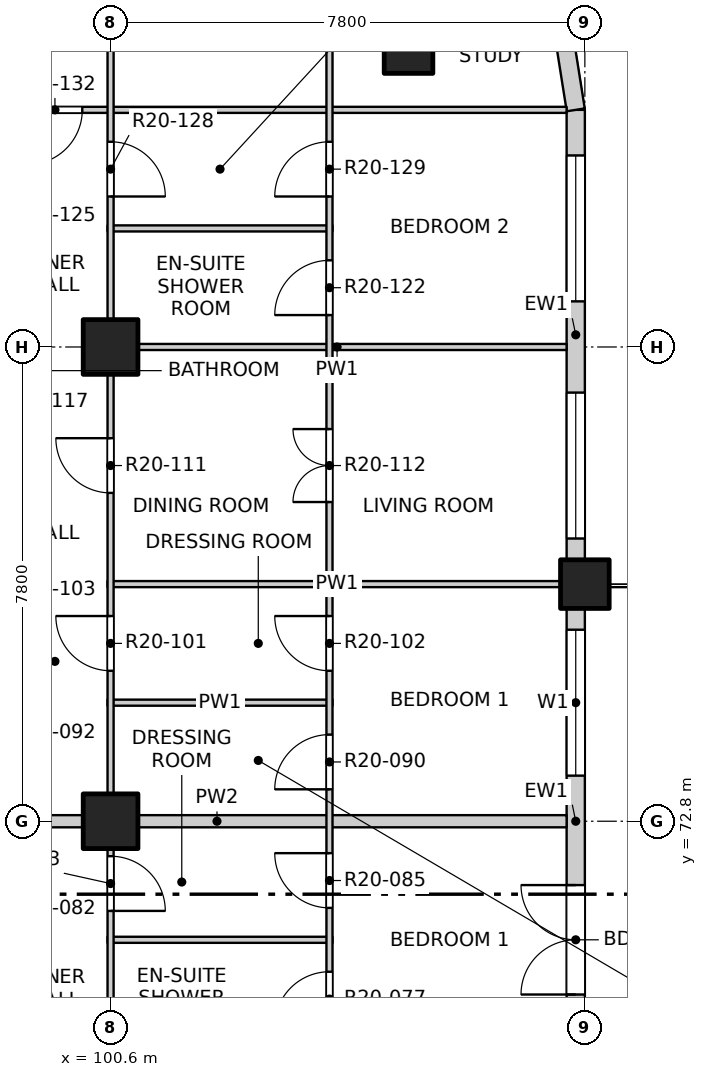
"""IFC4 building model, lengths in metres.
Left out: names, types, materials, properties, quantities, classifications, styles, units other than length and angle.
Written with IfcOpenShell. Run it as: python <this file> out.ifc"""

import sys

from ifc_helpers import new_model, si_unit, direction, frame, frame_2d, origin, origin_2d, place, context, subcontext, project, spatial, rectangle, extrude, element, fill, save


model = new_model("IFC4")
c1 = context("Model", 3, precision=1e-05, world=origin(), true_north=direction((0.0, 1.0)))
c2 = subcontext(c1, "Body", "Model", "MODEL_VIEW")
j1 = project(units=[si_unit("LENGTHUNIT", "METRE"), si_unit("PLANEANGLEUNIT", "RADIAN")], contexts=[c1])
p1 = place(None, origin())
s1 = spatial("IfcSite", under=j1, at=p1, CompositionType="ELEMENT")
p2 = place(p1, origin())
s2 = spatial("IfcBuilding", under=s1, at=p2, CompositionType="ELEMENT")
p3 = place(p2, frame((0.0, 0.0, 204.1)))
s3 = spatial("IfcBuildingStorey", under=s2, at=p3, CompositionType="ELEMENT", Elevation=204.1)
for number, where, z_axis, x_axis in (
    (1, (105.5, 85.5, -0.25), (0.0, 0.0, 1.0), (1.0, 0.0, 0.0)),
    (2, (108.4, 76.7, -0.25), (0.0, 0.0, 1.0), (1.0, 0.0, 0.0)),
):
    element("IfcColumn", number, at=place(p3, frame(where, z_axis=z_axis, x_axis=x_axis)), inside=s3, PredefinedType="COLUMN", context=c2, shape_type="SweptSolid", body=[
        extrude(rectangle(XDim=0.8, YDim=0.8, at=origin_2d()), origin(), (0.0, 0.0, 1.0), 3.4),
    ])
for number, where, z_axis, x_axis in (
    (3, (100.6, 72.8, -0.25), (0.0, 0.0, 1.0), (1.0, 0.0, 0.0)),
    (4, (100.6, 80.6, -0.25), (0.0, 0.0, 1.0), (1.0, 0.0, 0.0)),
):
    element("IfcColumn", number, at=place(p3, frame(where, z_axis=z_axis, x_axis=x_axis)), inside=s3, PredefinedType="COLUMN", context=c2, shape_type="SweptSolid", body=[
        extrude(rectangle(XDim=0.9, YDim=0.9, at=origin_2d()), origin(), (0.0, 0.0, 1.0), 3.4),
    ])
p4 = place(p3, frame((108.25, 69.3, 0.0), z_axis=(0.0, 0.0, 1.0), x_axis=(0.0, 1.0, 0.0)))
e5 = element("IfcWall", 5, at=p4, inside=s3, PredefinedType="SOLIDWALL", context=c2, shape_type="SweptSolid", body=[
    extrude(rectangle(XDim=7.0, YDim=0.3, at=frame_2d((3.5, 0.0))), origin(), (0.0, 0.0, 1.0), 2.7),
])
p5 = place(p4, frame((0.65, 0.0, 0.0)))
e6 = element("IfcOpeningElement", 6, at=p5, cuts=e5, PredefinedType="OPENING", context=c2, shape_type="SweptSolid", body=[
    extrude(rectangle(XDim=1.8, YDim=2.4, at=frame_2d((0.9, 1.2))), frame((0.0, 0.16, 0.0), z_axis=(0.0, -1.0, 0.0), x_axis=(1.0, 0.0, 0.0)), (0.0, 0.0, 1.0), 0.32),
])
p6 = place(p4, frame((4.25, 0.0, 0.9)))
e7 = element("IfcOpeningElement", 7, at=p6, cuts=e5, PredefinedType="OPENING", context=c2, shape_type="SweptSolid", body=[
    extrude(rectangle(XDim=2.4, YDim=1.8, at=frame_2d((1.2, 0.9))), frame((0.0, 0.16, 0.0), z_axis=(0.0, -1.0, 0.0), x_axis=(1.0, 0.0, 0.0)), (0.0, 0.0, 1.0), 0.32),
])
p7 = place(p3, frame((108.25, 77.1, 0.0), z_axis=(0.0, 0.0, 1.0), x_axis=(0.0, 1.0, 0.0)))
e8 = element("IfcWall", 8, at=p7, inside=s3, PredefinedType="SOLIDWALL", context=c2, shape_type="SweptSolid", body=[
    extrude(rectangle(XDim=7.4, YDim=0.3, at=frame_2d((3.7, 0.0))), origin(), (0.0, 0.0, 1.0), 2.7),
])
p8 = place(p7, frame((0.35, 0.0, 0.9)))
e9 = element("IfcOpeningElement", 9, at=p8, cuts=e8, PredefinedType="OPENING", context=c2, shape_type="SweptSolid", body=[
    extrude(rectangle(XDim=2.4, YDim=1.8, at=frame_2d((1.2, 0.9))), frame((0.0, 0.16, 0.0), z_axis=(0.0, -1.0, 0.0), x_axis=(1.0, 0.0, 0.0)), (0.0, 0.0, 1.0), 0.32),
])
p9 = place(p7, frame((4.25, 0.0, 0.9)))
e10 = element("IfcOpeningElement", 10, at=p9, cuts=e8, PredefinedType="OPENING", context=c2, shape_type="SweptSolid", body=[
    extrude(rectangle(XDim=2.4, YDim=1.8, at=frame_2d((1.2, 0.9))), frame((0.0, 0.16, 0.0), z_axis=(0.0, -1.0, 0.0), x_axis=(1.0, 0.0, 0.0)), (0.0, 0.0, 1.0), 0.32),
])
p10 = place(p3, frame((108.25, 84.5, 0.0), z_axis=(0.0, 0.0, 1.0), x_axis=(-0.156496880861, 0.987678452879, 0.0)))
e11 = element("IfcWall", 11, at=p10, inside=s3, PredefinedType="SOLIDWALL", context=c2, shape_type="SweptSolid", body=[
    extrude(rectangle(XDim=1.173, YDim=0.3, at=frame_2d((0.586, 0.0))), origin(), (0.0, 0.0, 1.0), 2.7),
])
p11 = place(p3, frame((100.55, 70.85, 0.0), z_axis=(0.0, 0.0, 1.0), x_axis=(1.0, 0.0, 0.0)))
e12 = element("IfcWall", 12, at=p11, inside=s3, PredefinedType="PARTITIONING", context=c2, shape_type="SweptSolid", body=[
    extrude(rectangle(XDim=3.7, YDim=0.1, at=frame_2d((1.85, 0.0))), origin(), (0.0, 0.0, 1.0), 3.15),
])
p12 = place(p3, frame((96.6, 72.8, 0.0), z_axis=(0.0, 0.0, 1.0), x_axis=(1.0, 0.0, 0.0)))
e13 = element("IfcWall", 13, at=p12, inside=s3, PredefinedType="PARTITIONING", context=c2, shape_type="SweptSolid", body=[
    extrude(rectangle(XDim=11.5, YDim=0.2, at=frame_2d((5.75, 0.0))), origin(), (0.0, 0.0, 1.0), 3.15),
])
p13 = place(p3, frame((100.55, 74.75, 0.0), z_axis=(0.0, 0.0, 1.0), x_axis=(1.0, 0.0, 0.0)))
e14 = element("IfcWall", 14, at=p13, inside=s3, PredefinedType="PARTITIONING", context=c2, shape_type="SweptSolid", body=[
    extrude(rectangle(XDim=3.7, YDim=0.1, at=frame_2d((1.85, 0.0))), origin(), (0.0, 0.0, 1.0), 3.15),
])
p14 = place(p3, frame((100.55, 76.7, 0.0), z_axis=(0.0, 0.0, 1.0), x_axis=(1.0, 0.0, 0.0)))
e15 = element("IfcWall", 15, at=p14, inside=s3, PredefinedType="PARTITIONING", context=c2, shape_type="SweptSolid", body=[
    extrude(rectangle(XDim=7.55, YDim=0.1, at=frame_2d((3.775, 0.0))), origin(), (0.0, 0.0, 1.0), 2.55),
])
p15 = place(p3, frame((100.55, 80.6, 0.0), z_axis=(0.0, 0.0, 1.0), x_axis=(1.0, 0.0, 0.0)))
e16 = element("IfcWall", 16, at=p15, inside=s3, PredefinedType="PARTITIONING", context=c2, shape_type="SweptSolid", body=[
    extrude(rectangle(XDim=7.55, YDim=0.1, at=frame_2d((3.775, 0.0))), origin(), (0.0, 0.0, 1.0), 3.15),
])
p16 = place(p3, frame((100.55, 82.55, 0.0), z_axis=(0.0, 0.0, 1.0), x_axis=(1.0, 0.0, 0.0)))
e17 = element("IfcWall", 17, at=p16, inside=s3, PredefinedType="PARTITIONING", context=c2, shape_type="SweptSolid", body=[
    extrude(rectangle(XDim=3.7, YDim=0.1, at=frame_2d((1.85, 0.0))), origin(), (0.0, 0.0, 1.0), 3.15),
])
p17 = place(p3, frame((96.6, 84.5, 0.0), z_axis=(0.0, 0.0, 1.0), x_axis=(1.0, 0.0, 0.0)))
e18 = element("IfcWall", 18, at=p17, inside=s3, PredefinedType="PARTITIONING", context=c2, shape_type="SweptSolid", body=[
    extrude(rectangle(XDim=11.5, YDim=0.1, at=frame_2d((5.75, 0.0))), origin(), (0.0, 0.0, 1.0), 3.15),
])
p18 = place(p17, frame((2.635, 0.0, 0.0)))
e19 = element("IfcOpeningElement", 19, at=p18, cuts=e18, PredefinedType="OPENING", context=c2, shape_type="SweptSolid", body=[
    extrude(rectangle(XDim=0.9, YDim=2.1, at=frame_2d((0.45, 1.05))), frame((0.0, 0.06, 0.0), z_axis=(0.0, -1.0, 0.0), x_axis=(1.0, 0.0, 0.0)), (0.0, 0.0, 1.0), 0.12),
])
p19 = place(p3, frame((100.6, 41.9, 0.0), z_axis=(0.0, 0.0, 1.0), x_axis=(0.0, 1.0, 0.0)))
e20 = element("IfcWall", 20, at=p19, inside=s3, PredefinedType="PARTITIONING", context=c2, shape_type="SweptSolid", body=[
    extrude(rectangle(XDim=46.2, YDim=0.1, at=frame_2d((23.1, 0.0))), origin(), (0.0, 0.0, 1.0), 3.15),
])
p20 = place(p19, frame((1.2, 0.0, 0.0)))
e21 = element("IfcOpeningElement", 21, at=p20, cuts=e20, PredefinedType="OPENING", context=c2, shape_type="SweptSolid", body=[
    extrude(rectangle(XDim=0.9, YDim=2.1, at=frame_2d((0.45, 1.05))), frame((0.0, 0.06, 0.0), z_axis=(0.0, -1.0, 0.0), x_axis=(1.0, 0.0, 0.0)), (0.0, 0.0, 1.0), 0.12),
])
p21 = place(p19, frame((6.025, 0.0, 0.0)))
e22 = element("IfcOpeningElement", 22, at=p21, cuts=e20, PredefinedType="OPENING", context=c2, shape_type="SweptSolid", body=[
    extrude(rectangle(XDim=0.9, YDim=2.1, at=frame_2d((0.45, 1.05))), frame((0.0, 0.06, 0.0), z_axis=(0.0, -1.0, 0.0), x_axis=(1.0, 0.0, 0.0)), (0.0, 0.0, 1.0), 0.12),
])
p22 = place(p19, frame((9.0, 0.0, 0.0)))
e23 = element("IfcOpeningElement", 23, at=p22, cuts=e20, PredefinedType="OPENING", context=c2, shape_type="SweptSolid", body=[
    extrude(rectangle(XDim=0.9, YDim=2.1, at=frame_2d((0.45, 1.05))), frame((0.0, 0.06, 0.0), z_axis=(0.0, -1.0, 0.0), x_axis=(1.0, 0.0, 0.0)), (0.0, 0.0, 1.0), 0.12),
])
p23 = place(p19, frame((13.85, 0.0, 0.0)))
e24 = element("IfcOpeningElement", 24, at=p23, cuts=e20, PredefinedType="OPENING", context=c2, shape_type="SweptSolid", body=[
    extrude(rectangle(XDim=0.9, YDim=2.1, at=frame_2d((0.45, 1.05))), frame((0.0, 0.06, 0.0), z_axis=(0.0, -1.0, 0.0), x_axis=(1.0, 0.0, 0.0)), (0.0, 0.0, 1.0), 0.12),
])
p24 = place(p19, frame((17.775, 0.0, 0.0)))
e25 = element("IfcOpeningElement", 25, at=p24, cuts=e20, PredefinedType="OPENING", context=c2, shape_type="SweptSolid", body=[
    extrude(rectangle(XDim=0.9, YDim=2.1, at=frame_2d((0.45, 1.05))), frame((0.0, 0.06, 0.0), z_axis=(0.0, -1.0, 0.0), x_axis=(1.0, 0.0, 0.0)), (0.0, 0.0, 1.0), 0.12),
])
p25 = place(p19, frame((20.7, 0.0, 0.0)))
e26 = element("IfcOpeningElement", 26, at=p25, cuts=e20, PredefinedType="OPENING", context=c2, shape_type="SweptSolid", body=[
    extrude(rectangle(XDim=0.9, YDim=2.1, at=frame_2d((0.45, 1.05))), frame((0.0, 0.06, 0.0), z_axis=(0.0, -1.0, 0.0), x_axis=(1.0, 0.0, 0.0)), (0.0, 0.0, 1.0), 0.12),
])
p26 = place(p19, frame((24.6, 0.0, 0.0)))
e27 = element("IfcOpeningElement", 27, at=p26, cuts=e20, PredefinedType="OPENING", context=c2, shape_type="SweptSolid", body=[
    extrude(rectangle(XDim=0.9, YDim=2.1, at=frame_2d((0.45, 1.05))), frame((0.0, 0.06, 0.0), z_axis=(0.0, -1.0, 0.0), x_axis=(1.0, 0.0, 0.0)), (0.0, 0.0, 1.0), 0.12),
])
p27 = place(p19, frame((29.425, 0.0, 0.0)))
e28 = element("IfcOpeningElement", 28, at=p27, cuts=e20, PredefinedType="OPENING", context=c2, shape_type="SweptSolid", body=[
    extrude(rectangle(XDim=0.9, YDim=2.1, at=frame_2d((0.45, 1.05))), frame((0.0, 0.06, 0.0), z_axis=(0.0, -1.0, 0.0), x_axis=(1.0, 0.0, 0.0)), (0.0, 0.0, 1.0), 0.12),
])
p28 = place(p19, frame((33.375, 0.0, 0.0)))
e29 = element("IfcOpeningElement", 29, at=p28, cuts=e20, PredefinedType="OPENING", context=c2, shape_type="SweptSolid", body=[
    extrude(rectangle(XDim=0.9, YDim=2.1, at=frame_2d((0.45, 1.05))), frame((0.0, 0.06, 0.0), z_axis=(0.0, -1.0, 0.0), x_axis=(1.0, 0.0, 0.0)), (0.0, 0.0, 1.0), 0.12),
])
p29 = place(p19, frame((36.3, 0.0, 0.0)))
e30 = element("IfcOpeningElement", 30, at=p29, cuts=e20, PredefinedType="OPENING", context=c2, shape_type="SweptSolid", body=[
    extrude(rectangle(XDim=0.9, YDim=2.1, at=frame_2d((0.45, 1.05))), frame((0.0, 0.06, 0.0), z_axis=(0.0, -1.0, 0.0), x_axis=(1.0, 0.0, 0.0)), (0.0, 0.0, 1.0), 0.12),
])
p30 = place(p19, frame((41.175, 0.0, 0.0)))
e31 = element("IfcOpeningElement", 31, at=p30, cuts=e20, PredefinedType="OPENING", context=c2, shape_type="SweptSolid", body=[
    extrude(rectangle(XDim=0.9, YDim=2.1, at=frame_2d((0.45, 1.05))), frame((0.0, 0.06, 0.0), z_axis=(0.0, -1.0, 0.0), x_axis=(1.0, 0.0, 0.0)), (0.0, 0.0, 1.0), 0.12),
])
p31 = place(p19, frame((44.1, 0.0, 0.0)))
e32 = element("IfcOpeningElement", 32, at=p31, cuts=e20, PredefinedType="OPENING", context=c2, shape_type="SweptSolid", body=[
    extrude(rectangle(XDim=0.9, YDim=2.1, at=frame_2d((0.45, 1.05))), frame((0.0, 0.06, 0.0), z_axis=(0.0, -1.0, 0.0), x_axis=(1.0, 0.0, 0.0)), (0.0, 0.0, 1.0), 0.12),
])
p32 = place(p3, frame((104.2, 61.2, 0.0), z_axis=(0.0, 0.0, 1.0), x_axis=(0.0, 1.0, 0.0)))
e33 = element("IfcWall", 33, at=p32, inside=s3, PredefinedType="PARTITIONING", context=c2, shape_type="SweptSolid", body=[
    extrude(rectangle(XDim=26.9, YDim=0.1, at=frame_2d((13.45, 0.0))), origin(), (0.0, 0.0, 1.0), 3.15),
])
p33 = place(p32, frame((1.25, 0.0, 0.0)))
e34 = element("IfcOpeningElement", 34, at=p33, cuts=e33, PredefinedType="OPENING", context=c2, shape_type="SweptSolid", body=[
    extrude(rectangle(XDim=1.2, YDim=2.1, at=frame_2d((0.6, 1.05))), frame((0.0, 0.06, 0.0), z_axis=(0.0, -1.0, 0.0), x_axis=(1.0, 0.0, 0.0)), (0.0, 0.0, 1.0), 0.12),
])
p34 = place(p32, frame((5.15, 0.0, 0.0)))
e35 = element("IfcOpeningElement", 35, at=p34, cuts=e33, PredefinedType="OPENING", context=c2, shape_type="SweptSolid", body=[
    extrude(rectangle(XDim=1.2, YDim=2.1, at=frame_2d((0.6, 1.05))), frame((0.0, 0.06, 0.0), z_axis=(0.0, -1.0, 0.0), x_axis=(1.0, 0.0, 0.0)), (0.0, 0.0, 1.0), 0.12),
])
p35 = place(p32, frame((8.225, 0.0, 0.0)))
e36 = element("IfcOpeningElement", 36, at=p35, cuts=e33, PredefinedType="OPENING", context=c2, shape_type="SweptSolid", body=[
    extrude(rectangle(XDim=0.9, YDim=2.1, at=frame_2d((0.45, 1.05))), frame((0.0, 0.06, 0.0), z_axis=(0.0, -1.0, 0.0), x_axis=(1.0, 0.0, 0.0)), (0.0, 0.0, 1.0), 0.12),
])
p36 = place(p32, frame((10.175, 0.0, 0.0)))
e37 = element("IfcOpeningElement", 37, at=p36, cuts=e33, PredefinedType="OPENING", context=c2, shape_type="SweptSolid", body=[
    extrude(rectangle(XDim=0.9, YDim=2.1, at=frame_2d((0.45, 1.05))), frame((0.0, 0.06, 0.0), z_axis=(0.0, -1.0, 0.0), x_axis=(1.0, 0.0, 0.0)), (0.0, 0.0, 1.0), 0.12),
])
p37 = place(p32, frame((12.125, 0.0, 0.0)))
e38 = element("IfcOpeningElement", 38, at=p37, cuts=e33, PredefinedType="OPENING", context=c2, shape_type="SweptSolid", body=[
    extrude(rectangle(XDim=0.9, YDim=2.1, at=frame_2d((0.45, 1.05))), frame((0.0, 0.06, 0.0), z_axis=(0.0, -1.0, 0.0), x_axis=(1.0, 0.0, 0.0)), (0.0, 0.0, 1.0), 0.12),
])
p38 = place(p32, frame((14.075, 0.0, 0.0)))
e39 = element("IfcOpeningElement", 39, at=p38, cuts=e33, PredefinedType="OPENING", context=c2, shape_type="SweptSolid", body=[
    extrude(rectangle(XDim=0.9, YDim=2.1, at=frame_2d((0.45, 1.05))), frame((0.0, 0.06, 0.0), z_axis=(0.0, -1.0, 0.0), x_axis=(1.0, 0.0, 0.0)), (0.0, 0.0, 1.0), 0.12),
])
p39 = place(p32, frame((16.85, 0.0, 0.0)))
e40 = element("IfcOpeningElement", 40, at=p39, cuts=e33, PredefinedType="OPENING", context=c2, shape_type="SweptSolid", body=[
    extrude(rectangle(XDim=1.2, YDim=2.1, at=frame_2d((0.6, 1.05))), frame((0.0, 0.06, 0.0), z_axis=(0.0, -1.0, 0.0), x_axis=(1.0, 0.0, 0.0)), (0.0, 0.0, 1.0), 0.12),
])
p40 = place(p32, frame((19.925, 0.0, 0.0)))
e41 = element("IfcOpeningElement", 41, at=p40, cuts=e33, PredefinedType="OPENING", context=c2, shape_type="SweptSolid", body=[
    extrude(rectangle(XDim=0.9, YDim=2.1, at=frame_2d((0.45, 1.05))), frame((0.0, 0.06, 0.0), z_axis=(0.0, -1.0, 0.0), x_axis=(1.0, 0.0, 0.0)), (0.0, 0.0, 1.0), 0.12),
])
p41 = place(p32, frame((21.875, 0.0, 0.0)))
e42 = element("IfcOpeningElement", 42, at=p41, cuts=e33, PredefinedType="OPENING", context=c2, shape_type="SweptSolid", body=[
    extrude(rectangle(XDim=0.9, YDim=2.1, at=frame_2d((0.45, 1.05))), frame((0.0, 0.06, 0.0), z_axis=(0.0, -1.0, 0.0), x_axis=(1.0, 0.0, 0.0)), (0.0, 0.0, 1.0), 0.12),
])
p42 = place(p32, frame((24.65, 0.0, 0.0)))
e43 = element("IfcOpeningElement", 43, at=p42, cuts=e33, PredefinedType="OPENING", context=c2, shape_type="SweptSolid", body=[
    extrude(rectangle(XDim=1.2, YDim=2.1, at=frame_2d((0.6, 1.05))), frame((0.0, 0.06, 0.0), z_axis=(0.0, -1.0, 0.0), x_axis=(1.0, 0.0, 0.0)), (0.0, 0.0, 1.0), 0.12),
])
p43 = place(p5, origin())
e44 = element("IfcDoor", 44, at=p43, inside=s3, OperationType="DOUBLE_DOOR_SINGLE_SWING", PredefinedType="DOOR", context=c2, shape_type="SweptSolid", body=[
    extrude(rectangle(XDim=1.8, YDim=2.4, at=frame_2d((0.9, 1.2))), frame((0.0, 0.025, 0.0), z_axis=(0.0, -1.0, 0.0), x_axis=(1.0, 0.0, 0.0)), (0.0, 0.0, 1.0), 0.05),
])
fill(e6, e44)
p44 = place(p6, origin())
e45 = element("IfcWindow", 45, at=p44, inside=s3, PartitioningType="DOUBLE_PANEL_VERTICAL", PredefinedType="WINDOW", context=c2, shape_type="SweptSolid", body=[
    extrude(rectangle(XDim=2.4, YDim=1.8, at=frame_2d((1.2, 0.9))), frame((0.0, 0.03, 0.0), z_axis=(0.0, -1.0, 0.0), x_axis=(1.0, 0.0, 0.0)), (0.0, 0.0, 1.0), 0.06),
])
fill(e7, e45)
p45 = place(p8, origin())
e46 = element("IfcWindow", 46, at=p45, inside=s3, PartitioningType="DOUBLE_PANEL_VERTICAL", PredefinedType="WINDOW", context=c2, shape_type="SweptSolid", body=[
    extrude(rectangle(XDim=2.4, YDim=1.8, at=frame_2d((1.2, 0.9))), frame((0.0, 0.03, 0.0), z_axis=(0.0, -1.0, 0.0), x_axis=(1.0, 0.0, 0.0)), (0.0, 0.0, 1.0), 0.06),
])
fill(e9, e46)
p46 = place(p9, origin())
e47 = element("IfcWindow", 47, at=p46, inside=s3, PartitioningType="DOUBLE_PANEL_VERTICAL", PredefinedType="WINDOW", context=c2, shape_type="SweptSolid", body=[
    extrude(rectangle(XDim=2.4, YDim=1.8, at=frame_2d((1.2, 0.9))), frame((0.0, 0.03, 0.0), z_axis=(0.0, -1.0, 0.0), x_axis=(1.0, 0.0, 0.0)), (0.0, 0.0, 1.0), 0.06),
])
fill(e10, e47)
p47 = place(p35, origin())
e48 = element("IfcDoor", 48, at=p47, inside=s3, OperationType="SINGLE_SWING_LEFT", PredefinedType="DOOR", context=c2, shape_type="SweptSolid", body=[
    extrude(rectangle(XDim=0.9, YDim=2.1, at=frame_2d((0.45, 1.05))), frame((0.0, 0.025, 0.0), z_axis=(0.0, -1.0, 0.0), x_axis=(1.0, 0.0, 0.0)), (0.0, 0.0, 1.0), 0.05),
])
fill(e36, e48)
p48 = place(p27, origin())
e49 = element("IfcDoor", 49, at=p48, inside=s3, OperationType="SINGLE_SWING_RIGHT", PredefinedType="DOOR", context=c2, shape_type="SweptSolid", body=[
    extrude(rectangle(XDim=0.9, YDim=2.1, at=frame_2d((0.45, 1.05))), frame((0.0, 0.025, 0.0), z_axis=(0.0, -1.0, 0.0), x_axis=(1.0, 0.0, 0.0)), (0.0, 0.0, 1.0), 0.05),
])
fill(e28, e49)
p49 = place(p36, origin())
e50 = element("IfcDoor", 50, at=p49, inside=s3, OperationType="SINGLE_SWING_RIGHT", PredefinedType="DOOR", context=c2, shape_type="SweptSolid", body=[
    extrude(rectangle(XDim=0.9, YDim=2.1, at=frame_2d((0.45, 1.05))), frame((0.0, 0.025, 0.0), z_axis=(0.0, -1.0, 0.0), x_axis=(1.0, 0.0, 0.0)), (0.0, 0.0, 1.0), 0.05),
])
fill(e37, e50)
p50 = place(p37, origin())
e51 = element("IfcDoor", 51, at=p50, inside=s3, OperationType="SINGLE_SWING_LEFT", PredefinedType="DOOR", context=c2, shape_type="SweptSolid", body=[
    extrude(rectangle(XDim=0.9, YDim=2.1, at=frame_2d((0.45, 1.05))), frame((0.0, 0.025, 0.0), z_axis=(0.0, -1.0, 0.0), x_axis=(1.0, 0.0, 0.0)), (0.0, 0.0, 1.0), 0.05),
])
fill(e38, e51)
p51 = place(p28, origin())
e52 = element("IfcDoor", 52, at=p51, inside=s3, OperationType="SINGLE_SWING_RIGHT", PredefinedType="DOOR", context=c2, shape_type="SweptSolid", body=[
    extrude(rectangle(XDim=0.9, YDim=2.1, at=frame_2d((0.45, 1.05))), frame((0.0, 0.025, 0.0), z_axis=(0.0, -1.0, 0.0), x_axis=(1.0, 0.0, 0.0)), (0.0, 0.0, 1.0), 0.05),
])
fill(e29, e52)
p52 = place(p38, origin())
e53 = element("IfcDoor", 53, at=p52, inside=s3, OperationType="SINGLE_SWING_RIGHT", PredefinedType="DOOR", context=c2, shape_type="SweptSolid", body=[
    extrude(rectangle(XDim=0.9, YDim=2.1, at=frame_2d((0.45, 1.05))), frame((0.0, 0.025, 0.0), z_axis=(0.0, -1.0, 0.0), x_axis=(1.0, 0.0, 0.0)), (0.0, 0.0, 1.0), 0.05),
])
fill(e39, e53)
p53 = place(p29, origin())
e54 = element("IfcDoor", 54, at=p53, inside=s3, OperationType="SINGLE_SWING_RIGHT", PredefinedType="DOOR", context=c2, shape_type="SweptSolid", body=[
    extrude(rectangle(XDim=0.9, YDim=2.1, at=frame_2d((0.45, 1.05))), frame((0.0, 0.025, 0.0), z_axis=(0.0, -1.0, 0.0), x_axis=(1.0, 0.0, 0.0)), (0.0, 0.0, 1.0), 0.05),
])
fill(e30, e54)
p54 = place(p39, origin())
e55 = element("IfcDoor", 55, at=p54, inside=s3, OperationType="DOUBLE_DOOR_SINGLE_SWING", PredefinedType="DOOR", context=c2, shape_type="SweptSolid", body=[
    extrude(rectangle(XDim=1.2, YDim=2.1, at=frame_2d((0.6, 1.05))), frame((0.0, 0.025, 0.0), z_axis=(0.0, -1.0, 0.0), x_axis=(1.0, 0.0, 0.0)), (0.0, 0.0, 1.0), 0.05),
])
fill(e40, e55)
p55 = place(p40, origin())
e56 = element("IfcDoor", 56, at=p55, inside=s3, OperationType="SINGLE_SWING_LEFT", PredefinedType="DOOR", context=c2, shape_type="SweptSolid", body=[
    extrude(rectangle(XDim=0.9, YDim=2.1, at=frame_2d((0.45, 1.05))), frame((0.0, 0.025, 0.0), z_axis=(0.0, -1.0, 0.0), x_axis=(1.0, 0.0, 0.0)), (0.0, 0.0, 1.0), 0.05),
])
fill(e41, e56)
p56 = place(p30, origin())
e57 = element("IfcDoor", 57, at=p56, inside=s3, OperationType="SINGLE_SWING_RIGHT", PredefinedType="DOOR", context=c2, shape_type="SweptSolid", body=[
    extrude(rectangle(XDim=0.9, YDim=2.1, at=frame_2d((0.45, 1.05))), frame((0.0, 0.025, 0.0), z_axis=(0.0, -1.0, 0.0), x_axis=(1.0, 0.0, 0.0)), (0.0, 0.0, 1.0), 0.05),
])
fill(e31, e57)
p57 = place(p41, origin())
e58 = element("IfcDoor", 58, at=p57, inside=s3, OperationType="SINGLE_SWING_LEFT", PredefinedType="DOOR", context=c2, shape_type="SweptSolid", body=[
    extrude(rectangle(XDim=0.9, YDim=2.1, at=frame_2d((0.45, 1.05))), frame((0.0, 0.025, 0.0), z_axis=(0.0, -1.0, 0.0), x_axis=(1.0, 0.0, 0.0)), (0.0, 0.0, 1.0), 0.05),
])
fill(e42, e58)
p58 = place(p18, origin())
e59 = element("IfcDoor", 59, at=p58, inside=s3, OperationType="SINGLE_SWING_RIGHT", PredefinedType="DOOR", context=c2, shape_type="SweptSolid", body=[
    extrude(rectangle(XDim=0.9, YDim=2.1, at=frame_2d((0.45, 1.05))), frame((0.0, 0.025, 0.0), z_axis=(0.0, -1.0, 0.0), x_axis=(1.0, 0.0, 0.0)), (0.0, 0.0, 1.0), 0.05),
])
fill(e19, e59)
save(model, sys.argv[1])
